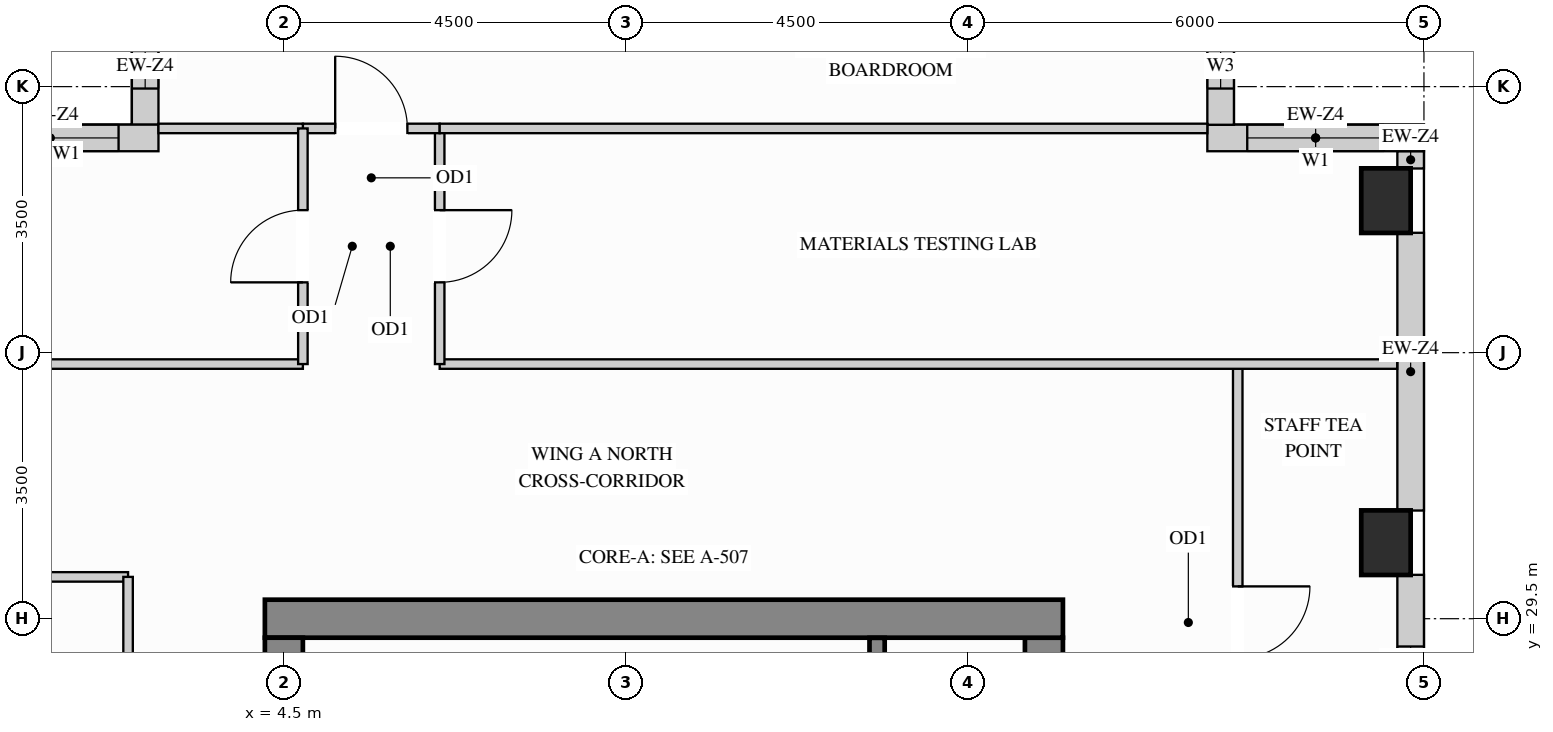
"""IFC4 building model, lengths in metres.
Left out: names, types, materials, properties, quantities, classifications, styles, units other than length and angle.
Written with IfcOpenShell. Run it as: python <this file> out.ifc"""

import sys

from ifc_helpers import new_model, si_unit, direction, frame, frame_2d, origin, origin_2d, place, context, subcontext, project, spatial, rectangle, extrude, source, transform, mapped, element, fill, save


model = new_model("IFC4")
c1 = context("Model", 3, precision=1e-05, world=origin(), true_north=direction((0.0, 1.0)))
c2 = subcontext(c1, "Body", "Model", "MODEL_VIEW")
j1 = project(units=[si_unit("LENGTHUNIT", "METRE"), si_unit("PLANEANGLEUNIT", "RADIAN")], contexts=[c1])
p1 = place(None, origin())
s1 = spatial("IfcSite", under=j1, at=p1, CompositionType="ELEMENT")
p2 = place(p1, origin())
s2 = spatial("IfcBuilding", under=s1, at=p2, CompositionType="ELEMENT")
p3 = place(p2, frame((0.0, 0.0, 230.4)))
s3 = spatial("IfcBuildingStorey", under=s2, at=p3, CompositionType="ELEMENT", Elevation=230.4)
m1 = source(origin(), c2, "Body", "SweptSolid", [
    extrude(rectangle(XDim=0.65, YDim=0.85, at=origin_2d()), origin(), (0.0, 0.0, 1.0), 3.4),
])
for number, where, z_axis, x_axis in (
    (1, (19.0, 30.5, 0.0), (0.0, 0.0, 1.0), (1.0, 0.0, 0.0)),
    (2, (19.0, 35.0, 0.0), (0.0, 0.0, 1.0), (1.0, 0.0, 0.0)),
):
    element("IfcColumn", number, at=place(p3, frame(where, z_axis=z_axis, x_axis=x_axis)), inside=s3, PredefinedType="COLUMN", context=c2, shape_type="MappedRepresentation", body=[
        mapped(m1, transform((0.0, 0.0, 0.0), x_axis=(1.0, 0.0, 0.0), y_axis=(0.0, 1.0, 0.0), z_axis=(0.0, 0.0, 1.0))),
    ])
m2 = source(origin(), c2, "Body", "SweptSolid", [
    extrude(rectangle(XDim=8.37, YDim=0.5, at=frame_2d((4.185, 0.0))), origin(), (0.0, 0.0, 1.0), 3.4),
])
p4 = place(p3, frame((14.5, 20.88, 0.0), z_axis=(0.0, 0.0, 1.0), x_axis=(0.0, 1.0, 0.0)))
e3 = element("IfcWall", 3, at=p4, inside=s3, PredefinedType="SHEAR", context=c2, shape_type="MappedRepresentation", body=[
    mapped(m2, transform((0.0, 0.0, 0.0), x_axis=(1.0, 0.0, 0.0), y_axis=(0.0, 1.0, 0.0), z_axis=(0.0, 0.0, 1.0))),
])
m3 = source(origin(), c2, "Body", "SweptSolid", [
    extrude(rectangle(XDim=10.5, YDim=0.5, at=frame_2d((5.25, 0.0))), origin(), (0.0, 0.0, 1.0), 3.4),
])
p5 = place(p3, frame((4.25, 29.5, 0.0), z_axis=(0.0, 0.0, 1.0), x_axis=(1.0, 0.0, 0.0)))
e4 = element("IfcWall", 4, at=p5, inside=s3, PredefinedType="SHEAR", context=c2, shape_type="MappedRepresentation", body=[
    mapped(m3, transform((0.0, 0.0, 0.0), x_axis=(1.0, 0.0, 0.0), y_axis=(0.0, 1.0, 0.0), z_axis=(0.0, 0.0, 1.0))),
])
m4 = source(origin(), c2, "Body", "SweptSolid", [
    extrude(rectangle(XDim=20.5, YDim=0.5, at=frame_2d((10.25, 0.0))), origin(), (0.0, 0.0, 1.0), 3.4),
])
p6 = place(p3, frame((4.5, 8.75, 0.0), z_axis=(0.0, 0.0, 1.0), x_axis=(0.0, 1.0, 0.0)))
e5 = element("IfcWall", 5, at=p6, inside=s3, PredefinedType="SHEAR", context=c2, shape_type="MappedRepresentation", body=[
    mapped(m4, transform((0.0, 0.0, 0.0), x_axis=(1.0, 0.0, 0.0), y_axis=(0.0, 1.0, 0.0), z_axis=(0.0, 0.0, 1.0))),
])
p7 = place(p3, frame((19.325, 27.223, 0.0), z_axis=(0.0, 0.0, 1.0), x_axis=(0.0, 1.0, 0.0)))
e6 = element("IfcWall", 6, at=p7, inside=s3, PredefinedType="SOLIDWALL", context=c2, shape_type="SweptSolid", body=[
    extrude(rectangle(XDim=2.854, YDim=0.35, at=frame_2d((1.427, 0.0))), origin(), (0.0, 0.0, 1.0), 2.619),
])
p8 = place(p7, frame((0.411, 0.0, 0.78)))
e7 = element("IfcOpeningElement", 7, at=p8, cuts=e6, PredefinedType="OPENING", context=c2, shape_type="SweptSolid", body=[
    extrude(rectangle(XDim=1.5, YDim=1.659, at=frame_2d((0.75, 0.83))), frame((0.0, 0.185, 0.0), z_axis=(0.0, -1.0, 0.0), x_axis=(1.0, 0.0, 0.0)), (0.0, 0.0, 1.0), 0.37),
])
m5 = source(origin(), c2, "Body", "SweptSolid", [
    extrude(rectangle(XDim=3.654, YDim=0.35, at=frame_2d((1.827, 0.0))), origin(), (0.0, 0.0, 1.0), 2.619),
])
p9 = place(p3, frame((19.325, 30.923, 0.0), z_axis=(0.0, 0.0, 1.0), x_axis=(0.0, 1.0, 0.0)))
e8 = element("IfcWall", 8, at=p9, inside=s3, PredefinedType="SOLIDWALL", context=c2, shape_type="MappedRepresentation", body=[
    mapped(m5, transform((0.0, 0.0, 0.0), x_axis=(1.0, 0.0, 0.0), y_axis=(0.0, 1.0, 0.0), z_axis=(0.0, 0.0, 1.0))),
])
m6 = source(origin(), c2, "Body", "SweptSolid", [
    extrude(rectangle(XDim=0.229, YDim=0.35, at=frame_2d((0.115, 0.0))), origin(), (0.0, 0.0, 1.0), 3.385),
])
p10 = place(p3, frame((19.325, 35.423, 0.0), z_axis=(0.0, 0.0, 1.0), x_axis=(0.0, 1.0, 0.0)))
e9 = element("IfcWall", 9, at=p10, inside=s3, PredefinedType="SOLIDWALL", context=c2, shape_type="MappedRepresentation", body=[
    mapped(m6, transform((0.0, 0.0, 0.0), x_axis=(1.0, 0.0, 0.0), y_axis=(0.0, 1.0, 0.0), z_axis=(0.0, 0.0, 1.0))),
])
p11 = place(p3, frame((19.5, 35.825, 0.0), z_axis=(0.0, 0.0, 1.0), x_axis=(-1.0, 0.0, 0.0)))
e10 = element("IfcWall", 10, at=p11, inside=s3, PredefinedType="SOLIDWALL", context=c2, shape_type="SweptSolid", body=[
    extrude(rectangle(XDim=2.85, YDim=0.35, at=frame_2d((1.425, 0.0))), origin(), (0.0, 0.0, 1.0), 3.385),
])
p12 = place(p11, frame((0.525, 0.0, 0.78)))
e11 = element("IfcOpeningElement", 11, at=p12, cuts=e10, PredefinedType="OPENING", context=c2, shape_type="SweptSolid", body=[
    extrude(rectangle(XDim=1.8, YDim=2.1, at=frame_2d((0.9, 1.05))), frame((0.0, 0.185, 0.0), z_axis=(0.0, -1.0, 0.0), x_axis=(1.0, 0.0, 0.0)), (0.0, 0.0, 1.0), 0.37),
])
p13 = place(p3, frame((16.825, 35.998, 0.0), z_axis=(0.0, 0.0, 1.0), x_axis=(0.0, 1.0, 0.0)))
e12 = element("IfcWall", 12, at=p13, inside=s3, PredefinedType="SOLIDWALL", context=c2, shape_type="SweptSolid", body=[
    extrude(rectangle(XDim=2.154, YDim=0.35, at=frame_2d((1.077, 0.0))), origin(), (0.0, 0.0, 1.0), 3.385),
])
p14 = place(p13, frame((0.477, 0.0, 0.78)))
e13 = element("IfcOpeningElement", 13, at=p14, cuts=e12, PredefinedType="OPENING", context=c2, shape_type="SweptSolid", body=[
    extrude(rectangle(XDim=1.2, YDim=2.1, at=frame_2d((0.6, 1.05))), frame((0.0, 0.185, 0.0), z_axis=(0.0, -1.0, 0.0), x_axis=(1.0, 0.0, 0.0)), (0.0, 0.0, 1.0), 0.37),
])
p15 = place(p3, frame((2.675, 38.152, 0.0), z_axis=(0.0, 0.0, 1.0), x_axis=(0.0, -1.0, 0.0)))
e14 = element("IfcWall", 14, at=p15, inside=s3, PredefinedType="SOLIDWALL", context=c2, shape_type="SweptSolid", body=[
    extrude(rectangle(XDim=2.154, YDim=0.35, at=frame_2d((1.077, 0.0))), origin(), (0.0, 0.0, 1.0), 3.385),
])
p16 = place(p15, frame((0.477, 0.0, 0.78)))
e15 = element("IfcOpeningElement", 15, at=p16, cuts=e14, PredefinedType="OPENING", context=c2, shape_type="SweptSolid", body=[
    extrude(rectangle(XDim=1.2, YDim=2.1, at=frame_2d((0.6, 1.05))), frame((0.0, 0.185, 0.0), z_axis=(0.0, -1.0, 0.0), x_axis=(1.0, 0.0, 0.0)), (0.0, 0.0, 1.0), 0.37),
])
p17 = place(p3, frame((2.85, 35.825, 0.0), z_axis=(0.0, 0.0, 1.0), x_axis=(-1.0, 0.0, 0.0)))
e16 = element("IfcWall", 16, at=p17, inside=s3, PredefinedType="SOLIDWALL", context=c2, shape_type="SweptSolid", body=[
    extrude(rectangle(XDim=2.85, YDim=0.35, at=frame_2d((1.425, 0.0))), origin(), (0.0, 0.0, 1.0), 3.385),
])
p18 = place(p17, frame((0.525, 0.0, 0.78)))
e17 = element("IfcOpeningElement", 17, at=p18, cuts=e16, PredefinedType="OPENING", context=c2, shape_type="SweptSolid", body=[
    extrude(rectangle(XDim=1.8, YDim=2.1, at=frame_2d((0.9, 1.05))), frame((0.0, 0.185, 0.0), z_axis=(0.0, -1.0, 0.0), x_axis=(1.0, 0.0, 0.0)), (0.0, 0.0, 1.0), 0.37),
])
p19 = place(p3, frame((17.05, 26.05, 0.0), z_axis=(0.0, 0.0, 1.0), x_axis=(0.0, 1.0, 0.0)))
e18 = element("IfcWall", 18, at=p19, inside=s3, PredefinedType="PARTITIONING", context=c2, shape_type="SweptSolid", body=[
    extrude(rectangle(XDim=6.8, YDim=0.125, at=frame_2d((3.4, 0.0))), origin(), (0.0, 0.0, 1.0), 3.385),
])
p20 = place(p19, frame((2.925, 0.0, 0.0)))
e19 = element("IfcOpeningElement", 19, at=p20, cuts=e18, PredefinedType="OPENING", context=c2, shape_type="SweptSolid", body=[
    extrude(rectangle(XDim=0.95, YDim=2.15, at=frame_2d((0.475, 1.075))), frame((0.0, 0.073, 0.0), z_axis=(0.0, -1.0, 0.0), x_axis=(1.0, 0.0, 0.0)), (0.0, 0.0, 1.0), 0.145),
])
m7 = source(origin(), c2, "Body", "SweptSolid", [
    extrude(rectangle(XDim=12.598, YDim=0.125, at=frame_2d((6.299, 0.0))), origin(), (0.0, 0.0, 1.0), 3.385),
])
p21 = place(p3, frame((6.55, 32.85, 0.0), z_axis=(0.0, 0.0, 1.0), x_axis=(1.0, 0.0, 0.0)))
e20 = element("IfcWall", 20, at=p21, inside=s3, PredefinedType="PARTITIONING", context=c2, shape_type="MappedRepresentation", body=[
    mapped(m7, transform((0.0, 0.0, 0.0), x_axis=(1.0, 0.0, 0.0), y_axis=(0.0, 1.0, 0.0), z_axis=(0.0, 0.0, 1.0))),
])
m8 = source(origin(), c2, "Body", "SweptSolid", [
    extrude(rectangle(XDim=4.398, YDim=0.125, at=frame_2d((2.199, 0.0))), origin(), (0.0, 0.0, 1.0), 3.385),
])
p22 = place(p3, frame((0.352, 32.85, 0.0), z_axis=(0.0, 0.0, 1.0), x_axis=(1.0, 0.0, 0.0)))
e21 = element("IfcWall", 21, at=p22, inside=s3, PredefinedType="PARTITIONING", context=c2, shape_type="MappedRepresentation", body=[
    mapped(m8, transform((0.0, 0.0, 0.0), x_axis=(1.0, 0.0, 0.0), y_axis=(0.0, 1.0, 0.0), z_axis=(0.0, 0.0, 1.0))),
])
m9 = source(origin(), c2, "Body", "SweptSolid", [
    extrude(rectangle(XDim=1.4, YDim=0.125, at=frame_2d((0.7, 0.0))), origin(), (0.0, 0.0, 1.0), 3.385),
])
p23 = place(p3, frame((1.05, 30.05, 0.0), z_axis=(0.0, 0.0, 1.0), x_axis=(1.0, 0.0, 0.0)))
e22 = element("IfcWall", 22, at=p23, inside=s3, PredefinedType="PARTITIONING", context=c2, shape_type="MappedRepresentation", body=[
    mapped(m9, transform((0.0, 0.0, 0.0), x_axis=(1.0, 0.0, 0.0), y_axis=(0.0, 1.0, 0.0), z_axis=(0.0, 0.0, 1.0))),
])
p24 = place(p3, frame((6.55, 32.85, 0.0), z_axis=(0.0, 0.0, 1.0), x_axis=(0.0, 1.0, 0.0)))
e23 = element("IfcWall", 23, at=p24, inside=s3, PredefinedType="PARTITIONING", context=c2, shape_type="SweptSolid", body=[
    extrude(rectangle(XDim=3.1, YDim=0.125, at=frame_2d((1.55, 0.0))), origin(), (0.0, 0.0, 1.0), 3.385),
])
p25 = place(p24, frame((1.075, 0.0, 0.0)))
e24 = element("IfcOpeningElement", 24, at=p25, cuts=e23, PredefinedType="OPENING", context=c2, shape_type="SweptSolid", body=[
    extrude(rectangle(XDim=0.95, YDim=2.15, at=frame_2d((0.475, 1.075))), frame((0.0, 0.073, 0.0), z_axis=(0.0, -1.0, 0.0), x_axis=(1.0, 0.0, 0.0)), (0.0, 0.0, 1.0), 0.145),
])
p26 = place(p3, frame((4.75, 35.95, 0.0), z_axis=(0.0, 0.0, 1.0), x_axis=(1.0, 0.0, 0.0)))
e25 = element("IfcWall", 25, at=p26, inside=s3, PredefinedType="PARTITIONING", context=c2, shape_type="SweptSolid", body=[
    extrude(rectangle(XDim=1.8, YDim=0.125, at=frame_2d((0.9, 0.0))), origin(), (0.0, 0.0, 1.0), 3.385),
])
p27 = place(p26, frame((0.425, 0.0, 0.0)))
e26 = element("IfcOpeningElement", 26, at=p27, cuts=e25, PredefinedType="OPENING", context=c2, shape_type="SweptSolid", body=[
    extrude(rectangle(XDim=0.95, YDim=2.15, at=frame_2d((0.475, 1.075))), frame((0.0, 0.073, 0.0), z_axis=(0.0, -1.0, 0.0), x_axis=(1.0, 0.0, 0.0)), (0.0, 0.0, 1.0), 0.145),
])
m10 = source(origin(), c2, "Body", "SweptSolid", [
    extrude(rectangle(XDim=10.1, YDim=0.125, at=frame_2d((5.05, 0.0))), origin(), (0.0, 0.0, 1.0), 3.385),
])
p28 = place(p3, frame((6.55, 35.95, 0.0), z_axis=(0.0, 0.0, 1.0), x_axis=(1.0, 0.0, 0.0)))
e27 = element("IfcWall", 27, at=p28, inside=s3, PredefinedType="PARTITIONING", context=c2, shape_type="MappedRepresentation", body=[
    mapped(m10, transform((0.0, 0.0, 0.0), x_axis=(1.0, 0.0, 0.0), y_axis=(0.0, 1.0, 0.0), z_axis=(0.0, 0.0, 1.0))),
])
m11 = source(origin(), c2, "Body", "SweptSolid", [
    extrude(rectangle(XDim=1.9, YDim=0.125, at=frame_2d((0.95, 0.0))), origin(), (0.0, 0.0, 1.0), 3.385),
])
p29 = place(p3, frame((2.85, 35.95, 0.0), z_axis=(0.0, 0.0, 1.0), x_axis=(1.0, 0.0, 0.0)))
e28 = element("IfcWall", 28, at=p29, inside=s3, PredefinedType="PARTITIONING", context=c2, shape_type="MappedRepresentation", body=[
    mapped(m11, transform((0.0, 0.0, 0.0), x_axis=(1.0, 0.0, 0.0), y_axis=(0.0, 1.0, 0.0), z_axis=(0.0, 0.0, 1.0))),
])
p30 = place(p3, frame((4.75, 32.85, 0.0), z_axis=(0.0, 0.0, 1.0), x_axis=(0.0, 1.0, 0.0)))
e29 = element("IfcWall", 29, at=p30, inside=s3, PredefinedType="PARTITIONING", context=c2, shape_type="SweptSolid", body=[
    extrude(rectangle(XDim=3.1, YDim=0.125, at=frame_2d((1.55, 0.0))), origin(), (0.0, 0.0, 1.0), 3.385),
])
p31 = place(p30, frame((1.075, 0.0, 0.0)))
e30 = element("IfcOpeningElement", 30, at=p31, cuts=e29, PredefinedType="OPENING", context=c2, shape_type="SweptSolid", body=[
    extrude(rectangle(XDim=0.95, YDim=2.15, at=frame_2d((0.475, 1.075))), frame((0.0, 0.073, 0.0), z_axis=(0.0, -1.0, 0.0), x_axis=(1.0, 0.0, 0.0)), (0.0, 0.0, 1.0), 0.145),
])
p32 = place(p3, frame((2.45, 22.6, 0.0), z_axis=(0.0, 0.0, 1.0), x_axis=(0.0, 1.0, 0.0)))
e31 = element("IfcWall", 31, at=p32, inside=s3, PredefinedType="PARTITIONING", context=c2, shape_type="SweptSolid", body=[
    extrude(rectangle(XDim=7.45, YDim=0.125, at=frame_2d((3.725, 0.0))), origin(), (0.0, 0.0, 1.0), 3.385),
])
p33 = place(p32, frame((3.25, 0.0, 0.0)))
e32 = element("IfcOpeningElement", 32, at=p33, cuts=e31, PredefinedType="OPENING", context=c2, shape_type="SweptSolid", body=[
    extrude(rectangle(XDim=0.95, YDim=2.15, at=frame_2d((0.475, 1.075))), frame((0.0, 0.073, 0.0), z_axis=(0.0, -1.0, 0.0), x_axis=(1.0, 0.0, 0.0)), (0.0, 0.0, 1.0), 0.145),
])
m12 = source(origin(), c2, "Body", "SweptSolid", [
    extrude(rectangle(XDim=3.803, YDim=0.2, at=frame_2d((1.901, 0.0))), origin(), (0.0, 0.0, 1.0), 3.4),
])
p34 = place(p3, frame((12.305, 25.445, 0.0), z_axis=(0.0, 0.0, 1.0), x_axis=(0.0, 1.0, 0.0)))
e33 = element("IfcWall", 33, at=p34, inside=s3, PredefinedType="SHEAR", context=c2, shape_type="MappedRepresentation", body=[
    mapped(m12, transform((0.0, 0.0, 0.0), x_axis=(1.0, 0.0, 0.0), y_axis=(0.0, 1.0, 0.0), z_axis=(0.0, 0.0, 1.0))),
])
m13 = source(origin(), c2, "Body", "SweptSolid", [
    extrude(rectangle(XDim=0.95, YDim=2.15, at=frame_2d((0.475, 1.075))), frame((0.0, 0.025, 0.0), z_axis=(0.0, -1.0, 0.0), x_axis=(1.0, 0.0, 0.0)), (0.0, 0.0, 1.0), 0.05),
])
p35 = place(p20, origin())
e34 = element("IfcDoor", 34, at=p35, inside=s3, OperationType="SINGLE_SWING_RIGHT", PredefinedType="DOOR", context=c2, shape_type="MappedRepresentation", body=[
    mapped(m13, transform((0.0, 0.0, 0.0), x_axis=(1.0, 0.0, 0.0), y_axis=(0.0, 1.0, 0.0), z_axis=(0.0, 0.0, 1.0))),
])
fill(e19, e34)
p36 = place(p25, origin())
e35 = element("IfcDoor", 35, at=p36, inside=s3, OperationType="SINGLE_SWING_RIGHT", PredefinedType="DOOR", context=c2, shape_type="MappedRepresentation", body=[
    mapped(m13, transform((0.0, 0.0, 0.0), x_axis=(1.0, 0.0, 0.0), y_axis=(0.0, 1.0, 0.0), z_axis=(0.0, 0.0, 1.0))),
])
fill(e24, e35)
p37 = place(p27, origin())
e36 = element("IfcDoor", 36, at=p37, inside=s3, OperationType="SINGLE_SWING_LEFT", PredefinedType="DOOR", context=c2, shape_type="MappedRepresentation", body=[
    mapped(m13, transform((0.0, 0.0, 0.0), x_axis=(1.0, 0.0, 0.0), y_axis=(0.0, 1.0, 0.0), z_axis=(0.0, 0.0, 1.0))),
])
fill(e26, e36)
p38 = place(p31, origin())
e37 = element("IfcDoor", 37, at=p38, inside=s3, OperationType="SINGLE_SWING_LEFT", PredefinedType="DOOR", context=c2, shape_type="MappedRepresentation", body=[
    mapped(m13, transform((0.0, 0.0, 0.0), x_axis=(1.0, 0.0, 0.0), y_axis=(0.0, 1.0, 0.0), z_axis=(0.0, 0.0, 1.0))),
])
fill(e30, e37)
m14 = source(origin(), c2, "Body", "SweptSolid", [
    extrude(rectangle(XDim=1.8, YDim=2.1, at=frame_2d((0.9, 1.05))), frame((0.0, 0.03, 0.0), z_axis=(0.0, -1.0, 0.0), x_axis=(1.0, 0.0, 0.0)), (0.0, 0.0, 1.0), 0.06),
])
p39 = place(p12, origin())
e38 = element("IfcWindow", 38, at=p39, inside=s3, PartitioningType="SINGLE_PANEL", PredefinedType="WINDOW", context=c2, shape_type="MappedRepresentation", body=[
    mapped(m14, transform((0.0, 0.0, 0.0), x_axis=(1.0, 0.0, 0.0), y_axis=(0.0, 1.0, 0.0), z_axis=(0.0, 0.0, 1.0))),
])
fill(e11, e38)
p40 = place(p18, origin())
e39 = element("IfcWindow", 39, at=p40, inside=s3, PartitioningType="SINGLE_PANEL", PredefinedType="WINDOW", context=c2, shape_type="MappedRepresentation", body=[
    mapped(m14, transform((0.0, 0.0, 0.0), x_axis=(1.0, 0.0, 0.0), y_axis=(0.0, 1.0, 0.0), z_axis=(0.0, 0.0, 1.0))),
])
fill(e17, e39)
m15 = source(origin(), c2, "Body", "SweptSolid", [
    extrude(rectangle(XDim=1.2, YDim=2.1, at=frame_2d((0.6, 1.05))), frame((0.0, 0.03, 0.0), z_axis=(0.0, -1.0, 0.0), x_axis=(1.0, 0.0, 0.0)), (0.0, 0.0, 1.0), 0.06),
])
p41 = place(p14, origin())
e40 = element("IfcWindow", 40, at=p41, inside=s3, PartitioningType="SINGLE_PANEL", PredefinedType="WINDOW", context=c2, shape_type="MappedRepresentation", body=[
    mapped(m15, transform((0.0, 0.0, 0.0), x_axis=(1.0, 0.0, 0.0), y_axis=(0.0, 1.0, 0.0), z_axis=(0.0, 0.0, 1.0))),
])
fill(e13, e40)
p42 = place(p16, origin())
e41 = element("IfcWindow", 41, at=p42, inside=s3, PartitioningType="SINGLE_PANEL", PredefinedType="WINDOW", context=c2, shape_type="MappedRepresentation", body=[
    mapped(m15, transform((0.0, 0.0, 0.0), x_axis=(1.0, 0.0, 0.0), y_axis=(0.0, 1.0, 0.0), z_axis=(0.0, 0.0, 1.0))),
])
fill(e15, e41)
m16 = source(origin(), c2, "Body", "SweptSolid", [
    extrude(rectangle(XDim=1.5, YDim=1.659, at=frame_2d((0.75, 0.83))), frame((0.0, 0.03, 0.0), z_axis=(0.0, -1.0, 0.0), x_axis=(1.0, 0.0, 0.0)), (0.0, 0.0, 1.0), 0.06),
])
p43 = place(p8, origin())
e42 = element("IfcWindow", 42, at=p43, inside=s3, PartitioningType="SINGLE_PANEL", PredefinedType="WINDOW", context=c2, shape_type="MappedRepresentation", body=[
    mapped(m16, transform((0.0, 0.0, 0.0), x_axis=(1.0, 0.0, 0.0), y_axis=(0.0, 1.0, 0.0), z_axis=(0.0, 0.0, 1.0))),
])
fill(e7, e42)
save(model, sys.argv[1])
